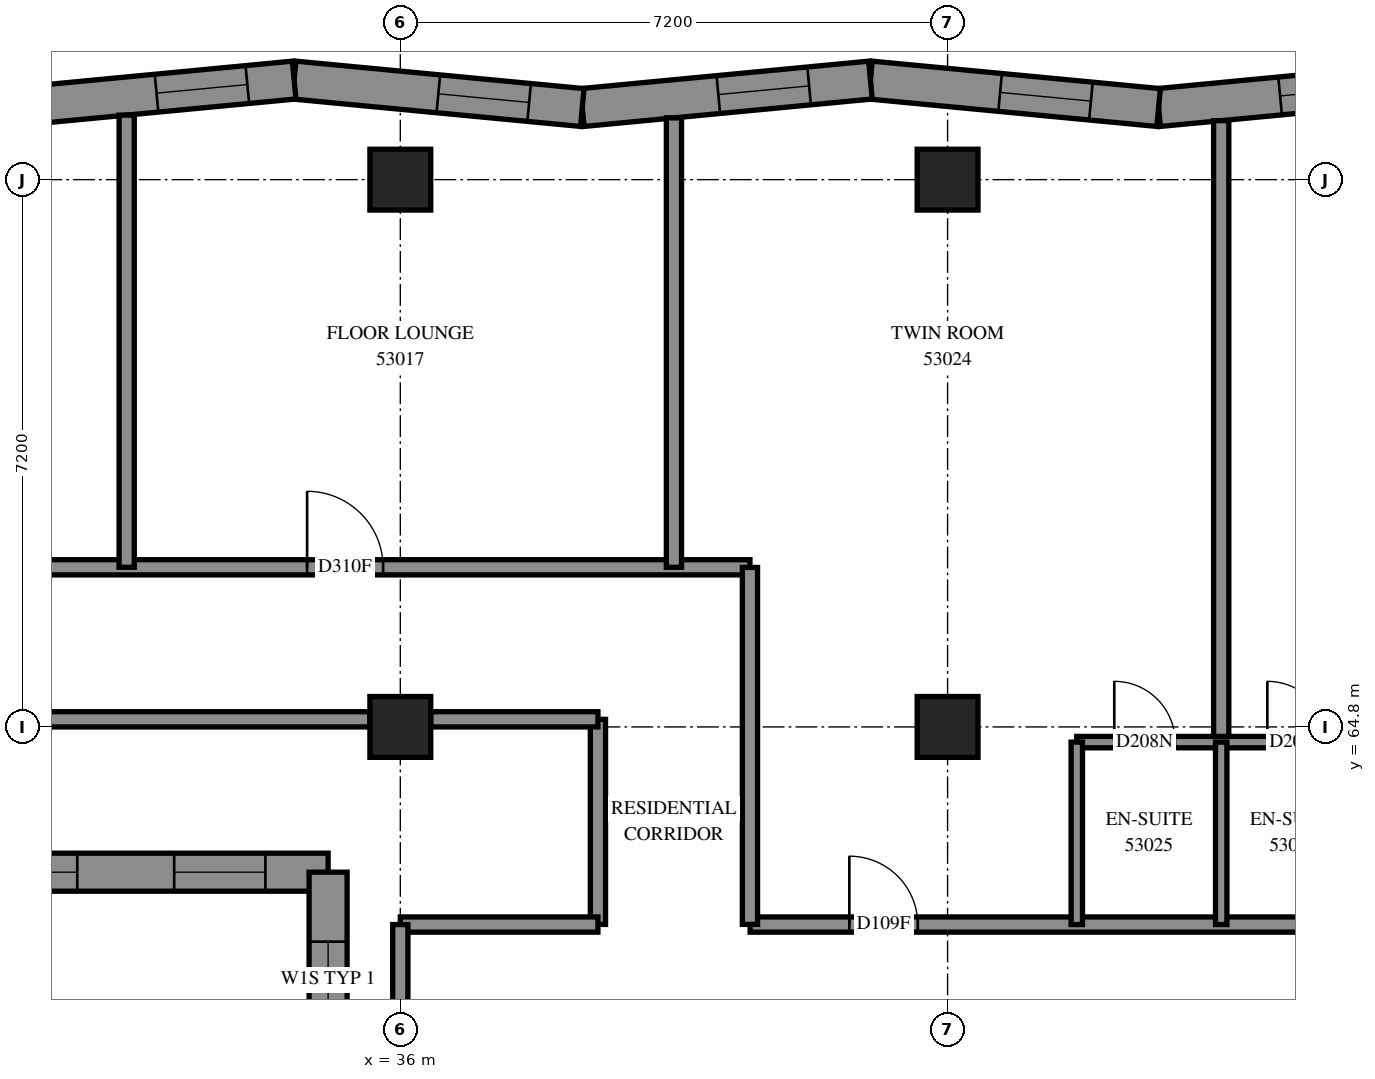
"""IFC4 building model, lengths in metres.
Left out: names, types, materials, properties, quantities, classifications, styles, units other than length and angle.
Written with IfcOpenShell. Run it as: python <this file> out.ifc"""

import sys

from ifc_helpers import new_model, si_unit, direction, frame, frame_2d, origin, origin_2d, place, context, subcontext, project, spatial, polyline, rectangle, outline, extrude, element, fill, save


model = new_model("IFC4")
c1 = context("Model", 3, precision=1e-05, world=origin(), true_north=direction((0.0, 1.0)))
c2 = subcontext(c1, "Body", "Model", "MODEL_VIEW")
j1 = project(units=[si_unit("LENGTHUNIT", "METRE"), si_unit("PLANEANGLEUNIT", "RADIAN")], contexts=[c1])
p1 = place(None, origin())
s1 = spatial("IfcSite", under=j1, at=p1, CompositionType="ELEMENT")
p2 = place(p1, origin())
s2 = spatial("IfcBuilding", under=s1, at=p2, CompositionType="ELEMENT")
p3 = place(p2, frame((0.0, 0.0, 196.4)))
s3 = spatial("IfcBuildingStorey", under=s2, at=p3, CompositionType="ELEMENT", Elevation=196.4)
for number, where, z_axis, x_axis in (
    (1, (36.0, 64.8, 0.0), (0.0, 0.0, 1.0), (1.0, 0.0, 0.0)),
    (2, (36.0, 72.0, 0.0), (0.0, 0.0, 1.0), (1.0, 0.0, 0.0)),
    (3, (43.2, 64.8, 0.0), (0.0, 0.0, 1.0), (1.0, 0.0, 0.0)),
    (4, (43.2, 72.0, 0.0), (0.0, 0.0, 1.0), (1.0, 0.0, 0.0)),
):
    element("IfcColumn", number, at=place(p3, frame(where, z_axis=z_axis, x_axis=x_axis)), inside=s3, PredefinedType="COLUMN", context=c2, shape_type="SweptSolid", body=[
        extrude(rectangle(XDim=0.8, YDim=0.8, at=origin_2d()), origin(), (0.0, 0.0, 1.0), 3.1),
    ])
p4 = place(p3, frame((49.767, 73.31, 0.0), z_axis=(0.0, 0.0, 1.0), x_axis=(-0.9954966527, -0.0947967005, 0.0)))
e5 = element("IfcWall", 5, at=p4, inside=s3, PredefinedType="SOLIDWALL", context=c2, shape_type="SweptSolid", body=[
    extrude(outline(polyline([(-0.024, -0.25), (3.784, -0.25), (3.832, 0.25), (0.024, 0.25), (-0.024, -0.25)])), origin(), (0.0, 0.0, 1.0), 3.1),
])
p5 = place(p4, frame((1.002, 0.0, 0.45)))
e6 = element("IfcOpeningElement", 6, at=p5, cuts=e5, PredefinedType="OPENING", context=c2, shape_type="SweptSolid", body=[
    extrude(rectangle(XDim=1.2, YDim=2.5, at=frame_2d((0.6, 1.25))), frame((0.0, 0.26, 0.0), z_axis=(0.0, -1.0, 0.0), x_axis=(1.0, 0.0, 0.0)), (0.0, 0.0, 1.0), 0.52),
])
p6 = place(p3, frame((45.976, 72.949, 0.0), z_axis=(0.0, 0.0, 1.0), x_axis=(-0.9954966527, 0.0947967005, 0.0)))
e7 = element("IfcWall", 7, at=p6, inside=s3, PredefinedType="SOLIDWALL", context=c2, shape_type="SweptSolid", body=[
    extrude(outline(polyline([(0.024, -0.25), (3.832, -0.25), (3.784, 0.25), (-0.024, 0.25), (0.024, -0.25)])), origin(), (0.0, 0.0, 1.0), 3.1),
])
p7 = place(p6, frame((0.894, 0.0, 0.45)))
e8 = element("IfcOpeningElement", 8, at=p7, cuts=e7, PredefinedType="OPENING", context=c2, shape_type="SweptSolid", body=[
    extrude(rectangle(XDim=1.2, YDim=2.5, at=frame_2d((0.6, 1.25))), frame((0.0, 0.26, 0.0), z_axis=(0.0, -1.0, 0.0), x_axis=(1.0, 0.0, 0.0)), (0.0, 0.0, 1.0), 0.52),
])
p8 = place(p3, frame((42.185, 73.31, 0.0), z_axis=(0.0, 0.0, 1.0), x_axis=(-0.9954968887, -0.0947942225, 0.0)))
e9 = element("IfcWall", 9, at=p8, inside=s3, PredefinedType="SOLIDWALL", context=c2, shape_type="SweptSolid", body=[
    extrude(outline(polyline([(-0.024, -0.25), (3.784, -0.25), (3.832, 0.25), (0.024, 0.25), (-0.024, -0.25)])), origin(), (0.0, 0.0, 1.0), 3.1),
])
p9 = place(p8, frame((0.81, 0.0, 0.45)))
e10 = element("IfcOpeningElement", 10, at=p9, cuts=e9, PredefinedType="OPENING", context=c2, shape_type="SweptSolid", body=[
    extrude(rectangle(XDim=1.2, YDim=2.5, at=frame_2d((0.6, 1.25))), frame((0.0, 0.26, 0.0), z_axis=(0.0, -1.0, 0.0), x_axis=(1.0, 0.0, 0.0)), (0.0, 0.0, 1.0), 0.52),
])
p10 = place(p3, frame((38.394, 72.949, 0.0), z_axis=(0.0, 0.0, 1.0), x_axis=(-0.9954966527, 0.0947967005, 0.0)))
e11 = element("IfcWall", 11, at=p10, inside=s3, PredefinedType="SOLIDWALL", context=c2, shape_type="SweptSolid", body=[
    extrude(outline(polyline([(0.024, -0.25), (3.832, -0.25), (3.784, 0.25), (-0.024, 0.25), (0.024, -0.25)])), origin(), (0.0, 0.0, 1.0), 3.1),
])
p11 = place(p10, frame((0.702, 0.0, 0.45)))
e12 = element("IfcOpeningElement", 12, at=p11, cuts=e11, PredefinedType="OPENING", context=c2, shape_type="SweptSolid", body=[
    extrude(rectangle(XDim=1.2, YDim=2.5, at=frame_2d((0.6, 1.25))), frame((0.0, 0.26, 0.0), z_axis=(0.0, -1.0, 0.0), x_axis=(1.0, 0.0, 0.0)), (0.0, 0.0, 1.0), 0.52),
])
p12 = place(p3, frame((34.603, 73.31, 0.0), z_axis=(0.0, 0.0, 1.0), x_axis=(-0.9954966527, -0.0947967005, 0.0)))
e13 = element("IfcWall", 13, at=p12, inside=s3, PredefinedType="SOLIDWALL", context=c2, shape_type="SweptSolid", body=[
    extrude(outline(polyline([(-0.024, -0.25), (3.784, -0.25), (3.832, 0.25), (0.024, 0.25), (-0.024, -0.25)])), origin(), (0.0, 0.0, 1.0), 3.1),
])
p13 = place(p12, frame((0.618, 0.0, 0.45)))
e14 = element("IfcOpeningElement", 14, at=p13, cuts=e13, PredefinedType="OPENING", context=c2, shape_type="SweptSolid", body=[
    extrude(rectangle(XDim=1.2, YDim=2.5, at=frame_2d((0.6, 1.25))), frame((0.0, 0.26, 0.0), z_axis=(0.0, -1.0, 0.0), x_axis=(1.0, 0.0, 0.0)), (0.0, 0.0, 1.0), 0.52),
])
p14 = place(p3, frame((19.689, 62.889, 0.0), z_axis=(0.0, 0.0, 1.0), x_axis=(1.0, 0.0, 0.0)))
e15 = element("IfcWall", 15, at=p14, inside=s3, PredefinedType="SOLIDWALL", context=c2, shape_type="SweptSolid", body=[
    extrude(outline(polyline([(-0.25, -0.25), (15.111, -0.25), (15.611, 0.25), (0.25, 0.25), (-0.25, -0.25)])), origin(), (0.0, 0.0, 1.0), 3.1),
])
p15 = place(p14, frame((2.311, 0.0, 0.45)))
e16 = element("IfcOpeningElement", 16, at=p15, cuts=e15, PredefinedType="OPENING", context=c2, shape_type="SweptSolid", body=[
    extrude(rectangle(XDim=1.3, YDim=2.5, at=frame_2d((0.65, 1.25))), frame((0.0, 0.26, 0.0), z_axis=(0.0, -1.0, 0.0), x_axis=(1.0, 0.0, 0.0)), (0.0, 0.0, 1.0), 0.52),
])
p16 = place(p14, frame((3.811, 0.0, 0.45)))
e17 = element("IfcOpeningElement", 17, at=p16, cuts=e15, PredefinedType="OPENING", context=c2, shape_type="SweptSolid", body=[
    extrude(rectangle(XDim=1.3, YDim=2.5, at=frame_2d((0.65, 1.25))), frame((0.0, 0.26, 0.0), z_axis=(0.0, -1.0, 0.0), x_axis=(1.0, 0.0, 0.0)), (0.0, 0.0, 1.0), 0.52),
])
p17 = place(p14, frame((5.911, 0.0, 0.45)))
e18 = element("IfcOpeningElement", 18, at=p17, cuts=e15, PredefinedType="OPENING", context=c2, shape_type="SweptSolid", body=[
    extrude(rectangle(XDim=1.3, YDim=2.5, at=frame_2d((0.65, 1.25))), frame((0.0, 0.26, 0.0), z_axis=(0.0, -1.0, 0.0), x_axis=(1.0, 0.0, 0.0)), (0.0, 0.0, 1.0), 0.52),
])
p18 = place(p14, frame((7.411, 0.0, 0.45)))
e19 = element("IfcOpeningElement", 19, at=p18, cuts=e15, PredefinedType="OPENING", context=c2, shape_type="SweptSolid", body=[
    extrude(rectangle(XDim=1.3, YDim=2.5, at=frame_2d((0.65, 1.25))), frame((0.0, 0.26, 0.0), z_axis=(0.0, -1.0, 0.0), x_axis=(1.0, 0.0, 0.0)), (0.0, 0.0, 1.0), 0.52),
])
p19 = place(p14, frame((9.261, 0.0, 0.45)))
e20 = element("IfcOpeningElement", 20, at=p19, cuts=e15, PredefinedType="OPENING", context=c2, shape_type="SweptSolid", body=[
    extrude(rectangle(XDim=1.3, YDim=2.5, at=frame_2d((0.65, 1.25))), frame((0.0, 0.26, 0.0), z_axis=(0.0, -1.0, 0.0), x_axis=(1.0, 0.0, 0.0)), (0.0, 0.0, 1.0), 0.52),
])
p20 = place(p14, frame((10.761, 0.0, 0.45)))
e21 = element("IfcOpeningElement", 21, at=p20, cuts=e15, PredefinedType="OPENING", context=c2, shape_type="SweptSolid", body=[
    extrude(rectangle(XDim=1.3, YDim=2.5, at=frame_2d((0.65, 1.25))), frame((0.0, 0.26, 0.0), z_axis=(0.0, -1.0, 0.0), x_axis=(1.0, 0.0, 0.0)), (0.0, 0.0, 1.0), 0.52),
])
p21 = place(p14, frame((0.581, 0.0, 0.45)))
e22 = element("IfcOpeningElement", 22, at=p21, cuts=e15, PredefinedType="OPENING", context=c2, shape_type="SweptSolid", body=[
    extrude(rectangle(XDim=1.2, YDim=2.5, at=frame_2d((0.6, 1.25))), frame((0.0, 0.26, 0.0), z_axis=(0.0, -1.0, 0.0), x_axis=(1.0, 0.0, 0.0)), (0.0, 0.0, 1.0), 0.52),
])
p22 = place(p14, frame((13.336, 0.0, 0.45)))
e23 = element("IfcOpeningElement", 23, at=p22, cuts=e15, PredefinedType="OPENING", context=c2, shape_type="SweptSolid", body=[
    extrude(rectangle(XDim=1.2, YDim=2.5, at=frame_2d((0.6, 1.25))), frame((0.0, 0.26, 0.0), z_axis=(0.0, -1.0, 0.0), x_axis=(1.0, 0.0, 0.0)), (0.0, 0.0, 1.0), 0.52),
])
p23 = place(p3, frame((35.05, 62.889, 0.0), z_axis=(0.0, 0.0, 1.0), x_axis=(0.0, -1.0, 0.0)))
e24 = element("IfcWall", 24, at=p23, inside=s3, PredefinedType="SOLIDWALL", context=c2, shape_type="SweptSolid", body=[
    extrude(outline(polyline([(0.25, -0.25), (6.489, -0.25), (5.989, 0.25), (-0.25, 0.25), (0.25, -0.25)])), origin(), (0.0, 0.0, 1.0), 3.1),
])
p24 = place(p23, frame((3.589, 0.0, 0.45)))
e25 = element("IfcOpeningElement", 25, at=p24, cuts=e24, PredefinedType="OPENING", context=c2, shape_type="SweptSolid", body=[
    extrude(rectangle(XDim=1.3, YDim=2.5, at=frame_2d((0.65, 1.25))), frame((0.0, 0.26, 0.0), z_axis=(0.0, -1.0, 0.0), x_axis=(1.0, 0.0, 0.0)), (0.0, 0.0, 1.0), 0.52),
])
p25 = place(p23, frame((0.914, 0.0, 0.45)))
e26 = element("IfcOpeningElement", 26, at=p25, cuts=e24, PredefinedType="OPENING", context=c2, shape_type="SweptSolid", body=[
    extrude(rectangle(XDim=1.0, YDim=2.5, at=frame_2d((0.5, 1.25))), frame((0.0, 0.26, 0.0), z_axis=(0.0, -1.0, 0.0), x_axis=(1.0, 0.0, 0.0)), (0.0, 0.0, 1.0), 0.52),
])
p26 = place(p3, frame((21.602, 66.9, 0.0), z_axis=(0.0, 0.0, 1.0), x_axis=(1.0, 0.0, 0.0)))
e27 = element("IfcWall", 27, at=p26, inside=s3, PredefinedType="PARTITIONING", context=c2, shape_type="SweptSolid", body=[
    extrude(rectangle(XDim=18.998, YDim=0.2, at=frame_2d((9.499, 0.0))), origin(), (0.0, 0.0, 1.0), 3.1),
])
p27 = place(p26, frame((5.972, 0.0, 0.0)))
e28 = element("IfcOpeningElement", 28, at=p27, cuts=e27, PredefinedType="OPENING", context=c2, shape_type="SweptSolid", body=[
    extrude(rectangle(XDim=1.0, YDim=2.1, at=frame_2d((0.5, 1.05))), frame((0.0, 0.11, 0.0), z_axis=(0.0, -1.0, 0.0), x_axis=(1.0, 0.0, 0.0)), (0.0, 0.0, 1.0), 0.22),
])
p28 = place(p26, frame((13.172, 0.0, 0.0)))
e29 = element("IfcOpeningElement", 29, at=p28, cuts=e27, PredefinedType="OPENING", context=c2, shape_type="SweptSolid", body=[
    extrude(rectangle(XDim=1.0, YDim=2.1, at=frame_2d((0.5, 1.05))), frame((0.0, 0.11, 0.0), z_axis=(0.0, -1.0, 0.0), x_axis=(1.0, 0.0, 0.0)), (0.0, 0.0, 1.0), 0.22),
])
p29 = place(p3, frame((40.602, 62.2, 0.0), z_axis=(0.0, 0.0, 1.0), x_axis=(1.0, 0.0, 0.0)))
e30 = element("IfcWall", 30, at=p29, inside=s3, PredefinedType="PARTITIONING", context=c2, shape_type="SweptSolid", body=[
    extrude(rectangle(XDim=14.998, YDim=0.2, at=frame_2d((7.499, 0.0))), origin(), (0.0, 0.0, 1.0), 3.1),
])
p30 = place(p29, frame((1.306, 0.0, 0.0)))
e31 = element("IfcOpeningElement", 31, at=p30, cuts=e30, PredefinedType="OPENING", context=c2, shape_type="SweptSolid", body=[
    extrude(rectangle(XDim=0.9, YDim=2.1, at=frame_2d((0.45, 1.05))), frame((0.0, 0.11, 0.0), z_axis=(0.0, -1.0, 0.0), x_axis=(1.0, 0.0, 0.0)), (0.0, 0.0, 1.0), 0.22),
])
p31 = place(p29, frame((8.548, 0.0, 0.0)))
e32 = element("IfcOpeningElement", 32, at=p31, cuts=e30, PredefinedType="OPENING", context=c2, shape_type="SweptSolid", body=[
    extrude(rectangle(XDim=0.9, YDim=2.1, at=frame_2d((0.45, 1.05))), frame((0.0, 0.11, 0.0), z_axis=(0.0, -1.0, 0.0), x_axis=(1.0, 0.0, 0.0)), (0.0, 0.0, 1.0), 0.22),
])
p32 = place(p29, frame((10.198, 0.0, 0.0)))
e33 = element("IfcOpeningElement", 33, at=p32, cuts=e30, PredefinedType="OPENING", context=c2, shape_type="SweptSolid", body=[
    extrude(rectangle(XDim=0.9, YDim=2.1, at=frame_2d((0.45, 1.05))), frame((0.0, 0.11, 0.0), z_axis=(0.0, -1.0, 0.0), x_axis=(1.0, 0.0, 0.0)), (0.0, 0.0, 1.0), 0.22),
])
p33 = place(p29, frame((13.746, 0.0, 0.0)))
e34 = element("IfcOpeningElement", 34, at=p33, cuts=e30, PredefinedType="OPENING", context=c2, shape_type="SweptSolid", body=[
    extrude(rectangle(XDim=1.0, YDim=2.1, at=frame_2d((0.5, 1.05))), frame((0.0, 0.11, 0.0), z_axis=(0.0, -1.0, 0.0), x_axis=(1.0, 0.0, 0.0)), (0.0, 0.0, 1.0), 0.22),
])
p34 = place(p3, frame((46.8, 64.6, 0.0), z_axis=(0.0, 0.0, 1.0), x_axis=(0.0, 1.0, 0.0)))
e35 = element("IfcWall", 35, at=p34, inside=s3, PredefinedType="PARTITIONING", context=c2, shape_type="SweptSolid", body=[
    extrude(rectangle(XDim=8.176, YDim=0.2, at=frame_2d((4.088, 0.0))), origin(), (0.0, 0.0, 1.0), 3.1),
])
p35 = place(p3, frame((29.2, 64.9, 0.0), z_axis=(0.0, 0.0, 1.0), x_axis=(1.0, 0.0, 0.0)))
e36 = element("IfcWall", 36, at=p35, inside=s3, PredefinedType="PARTITIONING", context=c2, shape_type="SweptSolid", body=[
    extrude(rectangle(XDim=6.4, YDim=0.2, at=frame_2d((3.2, 0.0))), origin(), (0.0, 0.0, 1.0), 2.6),
])
p36 = place(p3, frame((32.4, 66.9, 0.0), z_axis=(0.0, 0.0, 1.0), x_axis=(0.0, 1.0, 0.0)))
e37 = element("IfcWall", 37, at=p36, inside=s3, PredefinedType="PARTITIONING", context=c2, shape_type="SweptSolid", body=[
    extrude(rectangle(XDim=5.949, YDim=0.2, at=frame_2d((2.974, 0.0))), origin(), (0.0, 0.0, 1.0), 3.1),
])
p37 = place(p3, frame((39.6, 66.9, 0.0), z_axis=(0.0, 0.0, 1.0), x_axis=(0.0, 1.0, 0.0)))
e38 = element("IfcWall", 38, at=p37, inside=s3, PredefinedType="PARTITIONING", context=c2, shape_type="SweptSolid", body=[
    extrude(rectangle(XDim=5.913, YDim=0.2, at=frame_2d((2.956, 0.0))), origin(), (0.0, 0.0, 1.0), 3.1),
])
p38 = place(p3, frame((40.6, 62.202, 0.0), z_axis=(0.0, 0.0, 1.0), x_axis=(0.0, 1.0, 0.0)))
e39 = element("IfcWall", 39, at=p38, inside=s3, PredefinedType="PARTITIONING", context=c2, shape_type="SweptSolid", body=[
    extrude(rectangle(XDim=4.696, YDim=0.2, at=frame_2d((2.348, 0.0))), origin(), (0.0, 0.0, 1.0), 3.1),
])
p39 = place(p3, frame((44.9, 64.6, 0.0), z_axis=(0.0, 0.0, 1.0), x_axis=(1.0, 0.0, 0.0)))
e40 = element("IfcWall", 40, at=p39, inside=s3, PredefinedType="PARTITIONING", context=c2, shape_type="SweptSolid", body=[
    extrude(rectangle(XDim=3.8, YDim=0.15, at=frame_2d((1.9, 0.0))), origin(), (0.0, 0.0, 1.0), 3.1),
])
p40 = place(p39, frame((0.493, 0.0, 0.0)))
e41 = element("IfcOpeningElement", 41, at=p40, cuts=e40, PredefinedType="OPENING", context=c2, shape_type="SweptSolid", body=[
    extrude(rectangle(XDim=0.8, YDim=2.1, at=frame_2d((0.4, 1.05))), frame((0.0, 0.085, 0.0), z_axis=(0.0, -1.0, 0.0), x_axis=(1.0, 0.0, 0.0)), (0.0, 0.0, 1.0), 0.17),
])
p41 = place(p39, frame((2.507, 0.0, 0.0)))
e42 = element("IfcOpeningElement", 42, at=p41, cuts=e40, PredefinedType="OPENING", context=c2, shape_type="SweptSolid", body=[
    extrude(rectangle(XDim=0.8, YDim=2.1, at=frame_2d((0.4, 1.05))), frame((0.0, 0.085, 0.0), z_axis=(0.0, -1.0, 0.0), x_axis=(1.0, 0.0, 0.0)), (0.0, 0.0, 1.0), 0.17),
])
p42 = place(p3, frame((38.6, 62.202, 0.0), z_axis=(0.0, 0.0, 1.0), x_axis=(0.0, 1.0, 0.0)))
e43 = element("IfcWall", 43, at=p42, inside=s3, PredefinedType="PARTITIONING", context=c2, shape_type="SweptSolid", body=[
    extrude(rectangle(XDim=2.698, YDim=0.2, at=frame_2d((1.349, 0.0))), origin(), (0.0, 0.0, 1.0), 3.1),
])
p43 = place(p3, frame((36.0, 62.2, 0.0), z_axis=(0.0, 0.0, 1.0), x_axis=(1.0, 0.0, 0.0)))
e44 = element("IfcWall", 44, at=p43, inside=s3, PredefinedType="PARTITIONING", context=c2, shape_type="SweptSolid", body=[
    extrude(rectangle(XDim=2.6, YDim=0.2, at=frame_2d((1.3, 0.0))), origin(), (0.0, 0.0, 1.0), 3.1),
])
for number, where, z_axis, x_axis in (
    (45, (44.9, 62.2, 0.0), (0.0, 0.0, 1.0), (0.0, 1.0, 0.0)),
    (46, (46.8, 62.2, 0.0), (0.0, 0.0, 1.0), (0.0, 1.0, 0.0)),
):
    element("IfcWall", number, at=place(p3, frame(where, z_axis=z_axis, x_axis=x_axis)), inside=s3, PredefinedType="PARTITIONING", context=c2, shape_type="SweptSolid", body=[
        extrude(rectangle(XDim=2.4, YDim=0.15, at=frame_2d((1.2, 0.0))), origin(), (0.0, 0.0, 1.0), 3.1),
    ])
p44 = place(p3, frame((36.4, 64.9, 0.0), z_axis=(0.0, 0.0, 1.0), x_axis=(1.0, 0.0, 0.0)))
e47 = element("IfcWall", 47, at=p44, inside=s3, PredefinedType="PARTITIONING", context=c2, shape_type="SweptSolid", body=[
    extrude(rectangle(XDim=2.2, YDim=0.2, at=frame_2d((1.1, 0.0))), origin(), (0.0, 0.0, 1.0), 3.1),
])
p45 = place(p3, frame((36.0, 60.2, 0.0), z_axis=(0.0, 0.0, 1.0), x_axis=(0.0, 1.0, 0.0)))
e48 = element("IfcWall", 48, at=p45, inside=s3, PredefinedType="PARTITIONING", context=c2, shape_type="SweptSolid", body=[
    extrude(rectangle(XDim=2.0, YDim=0.2, at=frame_2d((1.0, 0.0))), origin(), (0.0, 0.0, 1.0), 2.6),
])
p46 = place(p5, origin())
e49 = element("IfcWindow", 49, at=p46, inside=s3, PartitioningType="SINGLE_PANEL", PredefinedType="WINDOW", context=c2, shape_type="SweptSolid", body=[
    extrude(rectangle(XDim=1.2, YDim=2.5, at=frame_2d((0.6, 1.25))), frame((0.0, 0.18, 0.0), z_axis=(0.0, -1.0, 0.0), x_axis=(1.0, 0.0, 0.0)), (0.0, 0.0, 1.0), 0.06),
])
fill(e6, e49)
p47 = place(p7, origin())
e50 = element("IfcWindow", 50, at=p47, inside=s3, PartitioningType="SINGLE_PANEL", PredefinedType="WINDOW", context=c2, shape_type="SweptSolid", body=[
    extrude(rectangle(XDim=1.2, YDim=2.5, at=frame_2d((0.6, 1.25))), frame((0.0, 0.18, 0.0), z_axis=(0.0, -1.0, 0.0), x_axis=(1.0, 0.0, 0.0)), (0.0, 0.0, 1.0), 0.06),
])
fill(e8, e50)
p48 = place(p9, origin())
e51 = element("IfcWindow", 51, at=p48, inside=s3, PartitioningType="SINGLE_PANEL", PredefinedType="WINDOW", context=c2, shape_type="SweptSolid", body=[
    extrude(rectangle(XDim=1.2, YDim=2.5, at=frame_2d((0.6, 1.25))), frame((0.0, 0.18, 0.0), z_axis=(0.0, -1.0, 0.0), x_axis=(1.0, 0.0, 0.0)), (0.0, 0.0, 1.0), 0.06),
])
fill(e10, e51)
p49 = place(p11, origin())
e52 = element("IfcWindow", 52, at=p49, inside=s3, PartitioningType="SINGLE_PANEL", PredefinedType="WINDOW", context=c2, shape_type="SweptSolid", body=[
    extrude(rectangle(XDim=1.2, YDim=2.5, at=frame_2d((0.6, 1.25))), frame((0.0, 0.18, 0.0), z_axis=(0.0, -1.0, 0.0), x_axis=(1.0, 0.0, 0.0)), (0.0, 0.0, 1.0), 0.06),
])
fill(e12, e52)
p50 = place(p13, origin())
e53 = element("IfcWindow", 53, at=p50, inside=s3, PartitioningType="SINGLE_PANEL", PredefinedType="WINDOW", context=c2, shape_type="SweptSolid", body=[
    extrude(rectangle(XDim=1.2, YDim=2.5, at=frame_2d((0.6, 1.25))), frame((0.0, 0.18, 0.0), z_axis=(0.0, -1.0, 0.0), x_axis=(1.0, 0.0, 0.0)), (0.0, 0.0, 1.0), 0.06),
])
fill(e14, e53)
p51 = place(p20, origin())
e54 = element("IfcWindow", 54, at=p51, inside=s3, PartitioningType="SINGLE_PANEL", PredefinedType="WINDOW", context=c2, shape_type="SweptSolid", body=[
    extrude(rectangle(XDim=1.3, YDim=2.5, at=frame_2d((0.65, 1.25))), frame((0.0, 0.18, 0.0), z_axis=(0.0, -1.0, 0.0), x_axis=(1.0, 0.0, 0.0)), (0.0, 0.0, 1.0), 0.06),
])
fill(e21, e54)
p52 = place(p22, origin())
e55 = element("IfcWindow", 55, at=p52, inside=s3, PartitioningType="SINGLE_PANEL", PredefinedType="WINDOW", context=c2, shape_type="SweptSolid", body=[
    extrude(rectangle(XDim=1.2, YDim=2.5, at=frame_2d((0.6, 1.25))), frame((0.0, 0.18, 0.0), z_axis=(0.0, -1.0, 0.0), x_axis=(1.0, 0.0, 0.0)), (0.0, 0.0, 1.0), 0.06),
])
fill(e23, e55)
p53 = place(p28, origin())
e56 = element("IfcDoor", 56, at=p53, inside=s3, OperationType="SINGLE_SWING_LEFT", PredefinedType="DOOR", context=c2, shape_type="SweptSolid", body=[
    extrude(rectangle(XDim=1.0, YDim=2.1, at=frame_2d((0.5, 1.05))), frame((0.0, 0.025, 0.0), z_axis=(0.0, -1.0, 0.0), x_axis=(1.0, 0.0, 0.0)), (0.0, 0.0, 1.0), 0.05),
])
fill(e29, e56)
p54 = place(p30, origin())
e57 = element("IfcDoor", 57, at=p54, inside=s3, OperationType="SINGLE_SWING_LEFT", PredefinedType="DOOR", context=c2, shape_type="SweptSolid", body=[
    extrude(rectangle(XDim=0.9, YDim=2.1, at=frame_2d((0.45, 1.05))), frame((0.0, 0.025, 0.0), z_axis=(0.0, -1.0, 0.0), x_axis=(1.0, 0.0, 0.0)), (0.0, 0.0, 1.0), 0.05),
])
fill(e31, e57)
p55 = place(p40, origin())
e58 = element("IfcDoor", 58, at=p55, inside=s3, OperationType="SINGLE_SWING_RIGHT", PredefinedType="DOOR", context=c2, shape_type="SweptSolid", body=[
    extrude(rectangle(XDim=0.8, YDim=2.1, at=frame_2d((0.4, 1.05))), frame((0.0, 0.025, 0.0), z_axis=(0.0, -1.0, 0.0), x_axis=(1.0, 0.0, 0.0)), (0.0, 0.0, 1.0), 0.05),
])
fill(e41, e58)
p56 = place(p41, origin())
e59 = element("IfcDoor", 59, at=p56, inside=s3, OperationType="SINGLE_SWING_RIGHT", PredefinedType="DOOR", context=c2, shape_type="SweptSolid", body=[
    extrude(rectangle(XDim=0.8, YDim=2.1, at=frame_2d((0.4, 1.05))), frame((0.0, 0.025, 0.0), z_axis=(0.0, -1.0, 0.0), x_axis=(1.0, 0.0, 0.0)), (0.0, 0.0, 1.0), 0.05),
])
fill(e42, e59)
p57 = place(p25, origin())
e60 = element("IfcWindow", 60, at=p57, inside=s3, PartitioningType="SINGLE_PANEL", PredefinedType="WINDOW", context=c2, shape_type="SweptSolid", body=[
    extrude(rectangle(XDim=1.0, YDim=2.5, at=frame_2d((0.5, 1.25))), frame((0.0, 0.18, 0.0), z_axis=(0.0, -1.0, 0.0), x_axis=(1.0, 0.0, 0.0)), (0.0, 0.0, 1.0), 0.06),
])
fill(e26, e60)
save(model, sys.argv[1])
